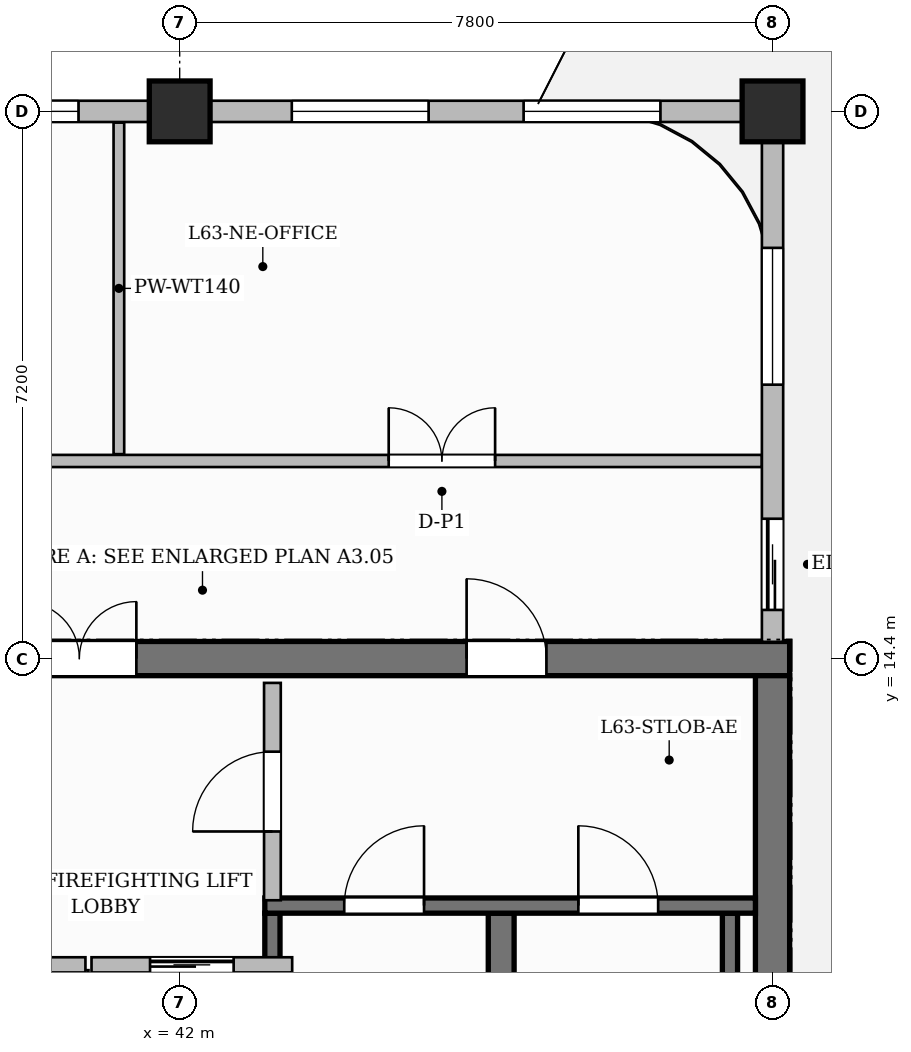
"""IFC4 building model, lengths in metres.
Left out: names, types, materials, properties, quantities, classifications, styles, units other than length and angle.
Written with IfcOpenShell. Run it as: python <this file> out.ifc"""

import sys

from ifc_helpers import new_model, si_unit, direction, frame, frame_2d, origin, origin_2d, place, context, subcontext, project, spatial, rectangle, extrude, source, transform, mapped, element, fill, save


model = new_model("IFC4")
c1 = context("Model", 3, precision=1e-05, world=origin(), true_north=direction((0.0, 1.0)))
c2 = subcontext(c1, "Body", "Model", "MODEL_VIEW")
j1 = project(units=[si_unit("LENGTHUNIT", "METRE"), si_unit("PLANEANGLEUNIT", "RADIAN")], contexts=[c1])
p1 = place(None, origin())
s1 = spatial("IfcSite", under=j1, at=p1, CompositionType="ELEMENT")
p2 = place(p1, origin())
s2 = spatial("IfcBuilding", under=s1, at=p2, CompositionType="ELEMENT")
p3 = place(p2, frame((0.0, 0.0, 251.95)))
s3 = spatial("IfcBuildingStorey", under=s2, at=p3, CompositionType="ELEMENT", Elevation=251.95)
p4 = place(p3, frame((34.575, 14.4, 0.0), z_axis=(0.0, 0.0, 1.0), x_axis=(1.0, 0.0, 0.0)))
e1 = element("IfcWall", 1, at=p4, inside=s3, PredefinedType="SHEAR", context=c2, shape_type="SweptSolid", body=[
    extrude(rectangle(XDim=15.45, YDim=0.45, at=frame_2d((7.725, 0.0))), origin(), (0.0, 0.0, 1.0), 3.85),
])
p5 = place(p4, frame((5.355, 0.0, 0.0)))
e2 = element("IfcOpeningElement", 2, at=p5, cuts=e1, PredefinedType="OPENING", context=c2, shape_type="SweptSolid", body=[
    extrude(rectangle(XDim=1.5, YDim=2.2, at=frame_2d((0.75, 1.1))), frame((0.0, 0.235, 0.0), z_axis=(0.0, -1.0, 0.0), x_axis=(1.0, 0.0, 0.0)), (0.0, 0.0, 1.0), 0.47),
])
p6 = place(p4, frame((1.57, 0.0, 0.0)))
e3 = element("IfcOpeningElement", 3, at=p6, cuts=e1, PredefinedType="OPENING", context=c2, shape_type="SweptSolid", body=[
    extrude(rectangle(XDim=1.05, YDim=2.15, at=frame_2d((0.525, 1.075))), frame((0.0, 0.235, 0.0), z_axis=(0.0, -1.0, 0.0), x_axis=(1.0, 0.0, 0.0)), (0.0, 0.0, 1.0), 0.47),
])
p7 = place(p4, frame((11.2, 0.0, 0.0)))
e4 = element("IfcOpeningElement", 4, at=p7, cuts=e1, PredefinedType="OPENING", context=c2, shape_type="SweptSolid", body=[
    extrude(rectangle(XDim=1.05, YDim=2.15, at=frame_2d((0.525, 1.075))), frame((0.0, 0.235, 0.0), z_axis=(0.0, -1.0, 0.0), x_axis=(1.0, 0.0, 0.0)), (0.0, 0.0, 1.0), 0.47),
])
p8 = place(p3, frame((49.8, 3.825, 0.0), z_axis=(0.0, 0.0, 1.0), x_axis=(0.0, 1.0, 0.0)))
e5 = element("IfcWall", 5, at=p8, inside=s3, PredefinedType="SHEAR", context=c2, shape_type="SweptSolid", body=[
    extrude(rectangle(XDim=10.35, YDim=0.45, at=frame_2d((5.175, 0.0))), origin(), (0.0, 0.0, 1.0), 3.85),
])
m1 = source(origin(), c2, "Body", "SweptSolid", [
    extrude(rectangle(XDim=0.8, YDim=0.8, at=origin_2d()), origin(), (0.0, 0.0, 1.0), 3.85),
])
for number, where, z_axis, x_axis in (
    (6, (42.0, 21.6, 0.0), (0.0, 0.0, 1.0), (1.0, 0.0, 0.0)),
    (7, (49.8, 21.6, 0.0), (0.0, 0.0, 1.0), (1.0, 0.0, 0.0)),
):
    element("IfcColumn", number, at=place(p3, frame(where, z_axis=z_axis, x_axis=x_axis)), inside=s3, PredefinedType="COLUMN", context=c2, shape_type="MappedRepresentation", body=[
        mapped(m1, transform((0.0, 0.0, 0.0), scale=1.0)),
    ])
p9 = place(p3, frame((43.22, 4.1, 0.0), z_axis=(0.0, 0.0, 1.0), x_axis=(0.0, 1.0, 0.0)))
e8 = element("IfcWall", 8, at=p9, inside=s3, PredefinedType="SHEAR", context=c2, shape_type="SweptSolid", body=[
    extrude(rectangle(XDim=6.95, YDim=0.2, at=frame_2d((3.475, 0.0))), origin(), (0.0, 0.0, 1.0), 3.85),
])
p10 = place(p3, frame((46.23, 4.1, 0.0), z_axis=(0.0, 0.0, 1.0), x_axis=(0.0, 1.0, 0.0)))
e9 = element("IfcWall", 9, at=p10, inside=s3, PredefinedType="SHEAR", context=c2, shape_type="SweptSolid", body=[
    extrude(rectangle(XDim=6.95, YDim=0.34, at=frame_2d((3.475, 0.0))), origin(), (0.0, 0.0, 1.0), 3.85),
])
p11 = place(p3, frame((49.24, 4.1, 0.0), z_axis=(0.0, 0.0, 1.0), x_axis=(0.0, 1.0, 0.0)))
e10 = element("IfcWall", 10, at=p11, inside=s3, PredefinedType="SHEAR", context=c2, shape_type="SweptSolid", body=[
    extrude(rectangle(XDim=6.95, YDim=0.2, at=frame_2d((3.475, 0.0))), origin(), (0.0, 0.0, 1.0), 3.85),
])
p12 = place(p3, frame((43.12, 11.15, 0.0), z_axis=(0.0, 0.0, 1.0), x_axis=(1.0, 0.0, 0.0)))
e11 = element("IfcWall", 11, at=p12, inside=s3, PredefinedType="SHEAR", context=c2, shape_type="SweptSolid", body=[
    extrude(rectangle(XDim=6.455, YDim=0.2, at=frame_2d((3.228, 0.0))), origin(), (0.0, 0.0, 1.0), 3.85),
])
p13 = place(p12, frame((1.045, 0.0, 0.0)))
e12 = element("IfcOpeningElement", 12, at=p13, cuts=e11, PredefinedType="OPENING", context=c2, shape_type="SweptSolid", body=[
    extrude(rectangle(XDim=1.05, YDim=2.2, at=frame_2d((0.525, 1.1))), frame((0.0, 0.11, 0.0), z_axis=(0.0, -1.0, 0.0), x_axis=(1.0, 0.0, 0.0)), (0.0, 0.0, 1.0), 0.22),
])
p14 = place(p12, frame((4.125, 0.0, 0.0)))
e13 = element("IfcOpeningElement", 13, at=p14, cuts=e11, PredefinedType="OPENING", context=c2, shape_type="SweptSolid", body=[
    extrude(rectangle(XDim=1.05, YDim=2.2, at=frame_2d((0.525, 1.1))), frame((0.0, 0.11, 0.0), z_axis=(0.0, -1.0, 0.0), x_axis=(1.0, 0.0, 0.0)), (0.0, 0.0, 1.0), 0.22),
])
p15 = place(p3, frame((40.7, 8.12, 0.0), z_axis=(0.0, 0.0, 1.0), x_axis=(0.0, 1.0, 0.0)))
e14 = element("IfcWall", 14, at=p15, inside=s3, PredefinedType="PARTITIONING", context=c2, shape_type="SweptSolid", body=[
    extrude(rectangle(XDim=2.18, YDim=0.2, at=frame_2d((1.09, 0.0))), origin(), (0.0, 0.0, 1.0), 3.6),
])
p16 = place(p3, frame((43.22, 11.22, 0.0), z_axis=(0.0, 0.0, 1.0), x_axis=(0.0, 1.0, 0.0)))
e15 = element("IfcWall", 15, at=p16, inside=s3, PredefinedType="PARTITIONING", context=c2, shape_type="SweptSolid", body=[
    extrude(rectangle(XDim=2.86, YDim=0.22, at=frame_2d((1.43, 0.0))), origin(), (0.0, 0.0, 1.0), 3.6),
])
p17 = place(p16, frame((0.905, 0.0, 0.0)))
e16 = element("IfcOpeningElement", 16, at=p17, cuts=e15, PredefinedType="OPENING", context=c2, shape_type="SweptSolid", body=[
    extrude(rectangle(XDim=1.05, YDim=2.15, at=frame_2d((0.525, 1.075))), frame((0.0, 0.12, 0.0), z_axis=(0.0, -1.0, 0.0), x_axis=(1.0, 0.0, 0.0)), (0.0, 0.0, 1.0), 0.24),
])
p18 = place(p3, frame((30.29, 17.0, 0.0), z_axis=(0.0, 0.0, 1.0), x_axis=(1.0, 0.0, 0.0)))
e17 = element("IfcWall", 17, at=p18, inside=s3, PredefinedType="PARTITIONING", context=c2, shape_type="SweptSolid", body=[
    extrude(rectangle(XDim=19.37, YDim=0.16, at=frame_2d((9.685, 0.0))), origin(), (0.0, 0.0, 1.0), 3.6),
])
p19 = place(p18, frame((1.185, 0.0, 0.0)))
e18 = element("IfcOpeningElement", 18, at=p19, cuts=e17, PredefinedType="OPENING", context=c2, shape_type="SweptSolid", body=[
    extrude(rectangle(XDim=0.85, YDim=2.1, at=frame_2d((0.425, 1.05))), frame((0.0, 0.09, 0.0), z_axis=(0.0, -1.0, 0.0), x_axis=(1.0, 0.0, 0.0)), (0.0, 0.0, 1.0), 0.18),
])
p20 = place(p18, frame((6.66, 0.0, 0.0)))
e19 = element("IfcOpeningElement", 19, at=p20, cuts=e17, PredefinedType="OPENING", context=c2, shape_type="SweptSolid", body=[
    extrude(rectangle(XDim=0.9, YDim=2.15, at=frame_2d((0.45, 1.075))), frame((0.0, 0.09, 0.0), z_axis=(0.0, -1.0, 0.0), x_axis=(1.0, 0.0, 0.0)), (0.0, 0.0, 1.0), 0.18),
])
p21 = place(p18, frame((14.46, 0.0, 0.0)))
e20 = element("IfcOpeningElement", 20, at=p21, cuts=e17, PredefinedType="OPENING", context=c2, shape_type="SweptSolid", body=[
    extrude(rectangle(XDim=1.4, YDim=2.35, at=frame_2d((0.7, 1.175))), frame((0.0, 0.09, 0.0), z_axis=(0.0, -1.0, 0.0), x_axis=(1.0, 0.0, 0.0)), (0.0, 0.0, 1.0), 0.18),
])
p22 = place(p3, frame((41.2, 17.09, 0.0), z_axis=(0.0, 0.0, 1.0), x_axis=(0.0, 1.0, 0.0)))
e21 = element("IfcWall", 21, at=p22, inside=s3, PredefinedType="PARTITIONING", context=c2, shape_type="SweptSolid", body=[
    extrude(rectangle(XDim=4.362, YDim=0.14, at=frame_2d((2.181, 0.0))), origin(), (0.0, 0.0, 1.0), 3.6),
])
p23 = place(p3, frame((38.12, 10.37, 0.0), z_axis=(0.0, 0.0, 1.0), x_axis=(1.0, 0.0, 0.0)))
e22 = element("IfcWall", 22, at=p23, inside=s3, PredefinedType="PARTITIONING", context=c2, shape_type="SweptSolid", body=[
    extrude(rectangle(XDim=2.64, YDim=0.2, at=frame_2d((1.32, 0.0))), origin(), (0.0, 0.0, 1.0), 3.6),
])
p24 = place(p23, frame((0.77, 0.0, 0.0)))
e23 = element("IfcOpeningElement", 23, at=p24, cuts=e22, PredefinedType="OPENING", context=c2, shape_type="SweptSolid", body=[
    extrude(rectangle(XDim=1.1, YDim=2.2, at=frame_2d((0.55, 1.1))), frame((0.0, 0.11, 0.0), z_axis=(0.0, -1.0, 0.0), x_axis=(1.0, 0.0, 0.0)), (0.0, 0.0, 1.0), 0.22),
])
p25 = place(p3, frame((40.84, 10.37, 0.0), z_axis=(0.0, 0.0, 1.0), x_axis=(1.0, 0.0, 0.0)))
e24 = element("IfcWall", 24, at=p25, inside=s3, PredefinedType="PARTITIONING", context=c2, shape_type="SweptSolid", body=[
    extrude(rectangle(XDim=2.64, YDim=0.2, at=frame_2d((1.32, 0.0))), origin(), (0.0, 0.0, 1.0), 3.6),
])
p26 = place(p25, frame((0.77, 0.0, 0.0)))
e25 = element("IfcOpeningElement", 25, at=p26, cuts=e24, PredefinedType="OPENING", context=c2, shape_type="SweptSolid", body=[
    extrude(rectangle(XDim=1.1, YDim=2.2, at=frame_2d((0.55, 1.1))), frame((0.0, 0.11, 0.0), z_axis=(0.0, -1.0, 0.0), x_axis=(1.0, 0.0, 0.0)), (0.0, 0.0, 1.0), 0.22),
])
p27 = place(p3, frame((49.8, 14.62, 0.0), z_axis=(0.0, 0.0, 1.0), x_axis=(0.0, 1.0, 0.0)))
e26 = element("IfcWall", 26, at=p27, inside=s3, PredefinedType="SOLIDWALL", context=c2, shape_type="SweptSolid", body=[
    extrude(rectangle(XDim=6.93, YDim=0.28, at=frame_2d((3.465, 0.0))), origin(), (0.0, 0.0, 1.0), 3.135),
])
p28 = place(p27, frame((0.42, 0.0, 0.0)))
e27 = element("IfcOpeningElement", 27, at=p28, cuts=e26, PredefinedType="OPENING", context=c2, shape_type="SweptSolid", body=[
    extrude(rectangle(XDim=1.2, YDim=2.2, at=frame_2d((0.6, 1.1))), frame((0.0, 0.15, 0.0), z_axis=(0.0, -1.0, 0.0), x_axis=(1.0, 0.0, 0.0)), (0.0, 0.0, 1.0), 0.3),
])
p29 = place(p27, frame((3.384, 0.0, 0.8)))
e28 = element("IfcOpeningElement", 28, at=p29, cuts=e26, PredefinedType="OPENING", context=c2, shape_type="SweptSolid", body=[
    extrude(rectangle(XDim=1.8, YDim=1.85, at=frame_2d((0.9, 0.925))), frame((0.0, 0.15, 0.0), z_axis=(0.0, -1.0, 0.0), x_axis=(1.0, 0.0, 0.0)), (0.0, 0.0, 1.0), 0.3),
])
p30 = place(p3, frame((18.0, 21.6, 0.0), z_axis=(0.0, 0.0, 1.0), x_axis=(1.0, 0.0, 0.0)))
e29 = element("IfcWall", 29, at=p30, inside=s3, PredefinedType="SOLIDWALL", context=c2, shape_type="SweptSolid", body=[
    extrude(rectangle(XDim=31.8, YDim=0.28, at=frame_2d((15.9, 0.0))), origin(), (0.0, 0.0, 1.0), 3.135),
])
p31 = place(p30, frame((0.885, 0.0, 0.8)))
e30 = element("IfcOpeningElement", 30, at=p31, cuts=e29, PredefinedType="OPENING", context=c2, shape_type="SweptSolid", body=[
    extrude(rectangle(XDim=1.4, YDim=1.85, at=frame_2d((0.7, 0.925))), frame((0.0, 0.15, 0.0), z_axis=(0.0, -1.0, 0.0), x_axis=(1.0, 0.0, 0.0)), (0.0, 0.0, 1.0), 0.3),
])
p32 = place(p30, frame((4.721, 0.0, 0.8)))
e31 = element("IfcOpeningElement", 31, at=p32, cuts=e29, PredefinedType="OPENING", context=c2, shape_type="SweptSolid", body=[
    extrude(rectangle(XDim=1.15, YDim=1.8, at=frame_2d((0.575, 0.9))), frame((0.0, 0.15, 0.0), z_axis=(0.0, -1.0, 0.0), x_axis=(1.0, 0.0, 0.0)), (0.0, 0.0, 1.0), 0.3),
])
p33 = place(p30, frame((7.204, 0.0, 0.8)))
e32 = element("IfcOpeningElement", 32, at=p33, cuts=e29, PredefinedType="OPENING", context=c2, shape_type="SweptSolid", body=[
    extrude(rectangle(XDim=1.8, YDim=1.85, at=frame_2d((0.9, 0.925))), frame((0.0, 0.15, 0.0), z_axis=(0.0, -1.0, 0.0), x_axis=(1.0, 0.0, 0.0)), (0.0, 0.0, 1.0), 0.3),
])
p34 = place(p30, frame((13.001, 0.0, 0.8)))
e33 = element("IfcOpeningElement", 33, at=p34, cuts=e29, PredefinedType="OPENING", context=c2, shape_type="SweptSolid", body=[
    extrude(rectangle(XDim=1.8, YDim=1.85, at=frame_2d((0.9, 0.925))), frame((0.0, 0.15, 0.0), z_axis=(0.0, -1.0, 0.0), x_axis=(1.0, 0.0, 0.0)), (0.0, 0.0, 1.0), 0.3),
])
p35 = place(p30, frame((18.123, 0.0, 0.8)))
e34 = element("IfcOpeningElement", 34, at=p35, cuts=e29, PredefinedType="OPENING", context=c2, shape_type="SweptSolid", body=[
    extrude(rectangle(XDim=1.8, YDim=1.85, at=frame_2d((0.9, 0.925))), frame((0.0, 0.15, 0.0), z_axis=(0.0, -1.0, 0.0), x_axis=(1.0, 0.0, 0.0)), (0.0, 0.0, 1.0), 0.3),
])
p36 = place(p30, frame((20.869, 0.0, 0.8)))
e35 = element("IfcOpeningElement", 35, at=p36, cuts=e29, PredefinedType="OPENING", context=c2, shape_type="SweptSolid", body=[
    extrude(rectangle(XDim=1.8, YDim=1.85, at=frame_2d((0.9, 0.925))), frame((0.0, 0.15, 0.0), z_axis=(0.0, -1.0, 0.0), x_axis=(1.0, 0.0, 0.0)), (0.0, 0.0, 1.0), 0.3),
])
p37 = place(p30, frame((25.475, 0.0, 0.8)))
e36 = element("IfcOpeningElement", 36, at=p37, cuts=e29, PredefinedType="OPENING", context=c2, shape_type="SweptSolid", body=[
    extrude(rectangle(XDim=1.8, YDim=1.85, at=frame_2d((0.9, 0.925))), frame((0.0, 0.15, 0.0), z_axis=(0.0, -1.0, 0.0), x_axis=(1.0, 0.0, 0.0)), (0.0, 0.0, 1.0), 0.3),
])
p38 = place(p30, frame((28.525, 0.0, 0.8)))
e37 = element("IfcOpeningElement", 37, at=p38, cuts=e29, PredefinedType="OPENING", context=c2, shape_type="SweptSolid", body=[
    extrude(rectangle(XDim=1.8, YDim=1.85, at=frame_2d((0.9, 0.925))), frame((0.0, 0.15, 0.0), z_axis=(0.0, -1.0, 0.0), x_axis=(1.0, 0.0, 0.0)), (0.0, 0.0, 1.0), 0.3),
])
m2 = source(origin(), c2, "Body", "SweptSolid", [
    extrude(rectangle(XDim=1.05, YDim=2.2, at=frame_2d((0.525, 1.1))), frame((0.0, 0.025, 0.0), z_axis=(0.0, -1.0, 0.0), x_axis=(1.0, 0.0, 0.0)), (0.0, 0.0, 1.0), 0.05),
])
p39 = place(p13, origin())
e38 = element("IfcDoor", 38, at=p39, inside=s3, OperationType="SINGLE_SWING_RIGHT", PredefinedType="DOOR", context=c2, shape_type="MappedRepresentation", body=[
    mapped(m2, transform((0.0, 0.0, 0.0), scale=1.0)),
])
fill(e12, e38)
p40 = place(p14, origin())
e39 = element("IfcDoor", 39, at=p40, inside=s3, OperationType="SINGLE_SWING_LEFT", PredefinedType="DOOR", context=c2, shape_type="MappedRepresentation", body=[
    mapped(m2, transform((0.0, 0.0, 0.0), scale=1.0)),
])
fill(e13, e39)
m3 = source(origin(), c2, "Body", "SweptSolid", [
    extrude(rectangle(XDim=1.05, YDim=2.15, at=frame_2d((0.525, 1.075))), frame((0.0, 0.025, 0.0), z_axis=(0.0, -1.0, 0.0), x_axis=(1.0, 0.0, 0.0)), (0.0, 0.0, 1.0), 0.05),
])
p41 = place(p17, origin())
e40 = element("IfcDoor", 40, at=p41, inside=s3, OperationType="SINGLE_SWING_LEFT", PredefinedType="DOOR", context=c2, shape_type="MappedRepresentation", body=[
    mapped(m3, transform((0.0, 0.0, 0.0), scale=1.0)),
])
fill(e16, e40)
m4 = source(origin(), c2, "Body", "SweptSolid", [
    extrude(rectangle(XDim=1.5, YDim=2.2, at=frame_2d((0.75, 1.1))), frame((0.0, 0.025, 0.0), z_axis=(0.0, -1.0, 0.0), x_axis=(1.0, 0.0, 0.0)), (0.0, 0.0, 1.0), 0.05),
])
p42 = place(p5, origin())
e41 = element("IfcDoor", 41, at=p42, inside=s3, OperationType="DOUBLE_DOOR_SINGLE_SWING", PredefinedType="DOOR", context=c2, shape_type="MappedRepresentation", body=[
    mapped(m4, transform((0.0, 0.0, 0.0), scale=1.0)),
])
fill(e2, e41)
p43 = place(p7, origin())
e42 = element("IfcDoor", 42, at=p43, inside=s3, OperationType="SINGLE_SWING_LEFT", PredefinedType="DOOR", context=c2, shape_type="MappedRepresentation", body=[
    mapped(m3, transform((0.0, 0.0, 0.0), scale=1.0)),
])
fill(e4, e42)
m5 = source(origin(), c2, "Body", "SweptSolid", [
    extrude(rectangle(XDim=1.4, YDim=2.35, at=frame_2d((0.7, 1.175))), frame((0.0, 0.025, 0.0), z_axis=(0.0, -1.0, 0.0), x_axis=(1.0, 0.0, 0.0)), (0.0, 0.0, 1.0), 0.05),
])
p44 = place(p21, origin())
e43 = element("IfcDoor", 43, at=p44, inside=s3, OperationType="DOUBLE_DOOR_SINGLE_SWING", PredefinedType="DOOR", context=c2, shape_type="MappedRepresentation", body=[
    mapped(m5, transform((0.0, 0.0, 0.0), scale=1.0)),
])
fill(e20, e43)
m6 = source(origin(), c2, "Body", "SweptSolid", [
    extrude(rectangle(XDim=1.1, YDim=2.2, at=frame_2d((0.55, 1.1))), frame((0.0, 0.025, 0.0), z_axis=(0.0, -1.0, 0.0), x_axis=(1.0, 0.0, 0.0)), (0.0, 0.0, 1.0), 0.05),
])
p45 = place(p26, origin())
e44 = element("IfcDoor", 44, at=p45, inside=s3, OperationType="SLIDING_TO_LEFT", PredefinedType="DOOR", context=c2, shape_type="MappedRepresentation", body=[
    mapped(m6, transform((0.0, 0.0, 0.0), scale=1.0)),
])
fill(e25, e44)
m7 = source(origin(), c2, "Body", "SweptSolid", [
    extrude(rectangle(XDim=1.2, YDim=2.2, at=frame_2d((0.6, 1.1))), frame((0.0, 0.025, 0.0), z_axis=(0.0, -1.0, 0.0), x_axis=(1.0, 0.0, 0.0)), (0.0, 0.0, 1.0), 0.05),
])
p46 = place(p28, origin())
e45 = element("IfcDoor", 45, at=p46, inside=s3, OperationType="SLIDING_TO_LEFT", PredefinedType="DOOR", context=c2, shape_type="MappedRepresentation", body=[
    mapped(m7, transform((0.0, 0.0, 0.0), scale=1.0)),
])
fill(e27, e45)
m8 = source(origin(), c2, "Body", "SweptSolid", [
    extrude(rectangle(XDim=1.8, YDim=1.85, at=frame_2d((0.9, 0.925))), frame((0.0, 0.03, 0.0), z_axis=(0.0, -1.0, 0.0), x_axis=(1.0, 0.0, 0.0)), (0.0, 0.0, 1.0), 0.06),
])
p47 = place(p29, origin())
e46 = element("IfcWindow", 46, at=p47, inside=s3, PartitioningType="DOUBLE_PANEL_VERTICAL", PredefinedType="WINDOW", context=c2, shape_type="MappedRepresentation", body=[
    mapped(m8, transform((0.0, 0.0, 0.0), scale=1.0)),
])
fill(e28, e46)
p48 = place(p36, origin())
e47 = element("IfcWindow", 47, at=p48, inside=s3, PartitioningType="DOUBLE_PANEL_VERTICAL", PredefinedType="WINDOW", context=c2, shape_type="MappedRepresentation", body=[
    mapped(m8, transform((0.0, 0.0, 0.0), scale=1.0)),
])
fill(e35, e47)
p49 = place(p37, origin())
e48 = element("IfcWindow", 48, at=p49, inside=s3, PartitioningType="DOUBLE_PANEL_VERTICAL", PredefinedType="WINDOW", context=c2, shape_type="MappedRepresentation", body=[
    mapped(m8, transform((0.0, 0.0, 0.0), scale=1.0)),
])
fill(e36, e48)
p50 = place(p38, origin())
e49 = element("IfcWindow", 49, at=p50, inside=s3, PartitioningType="DOUBLE_PANEL_VERTICAL", PredefinedType="WINDOW", context=c2, shape_type="MappedRepresentation", body=[
    mapped(m8, transform((0.0, 0.0, 0.0), scale=1.0)),
])
fill(e37, e49)
save(model, sys.argv[1])
